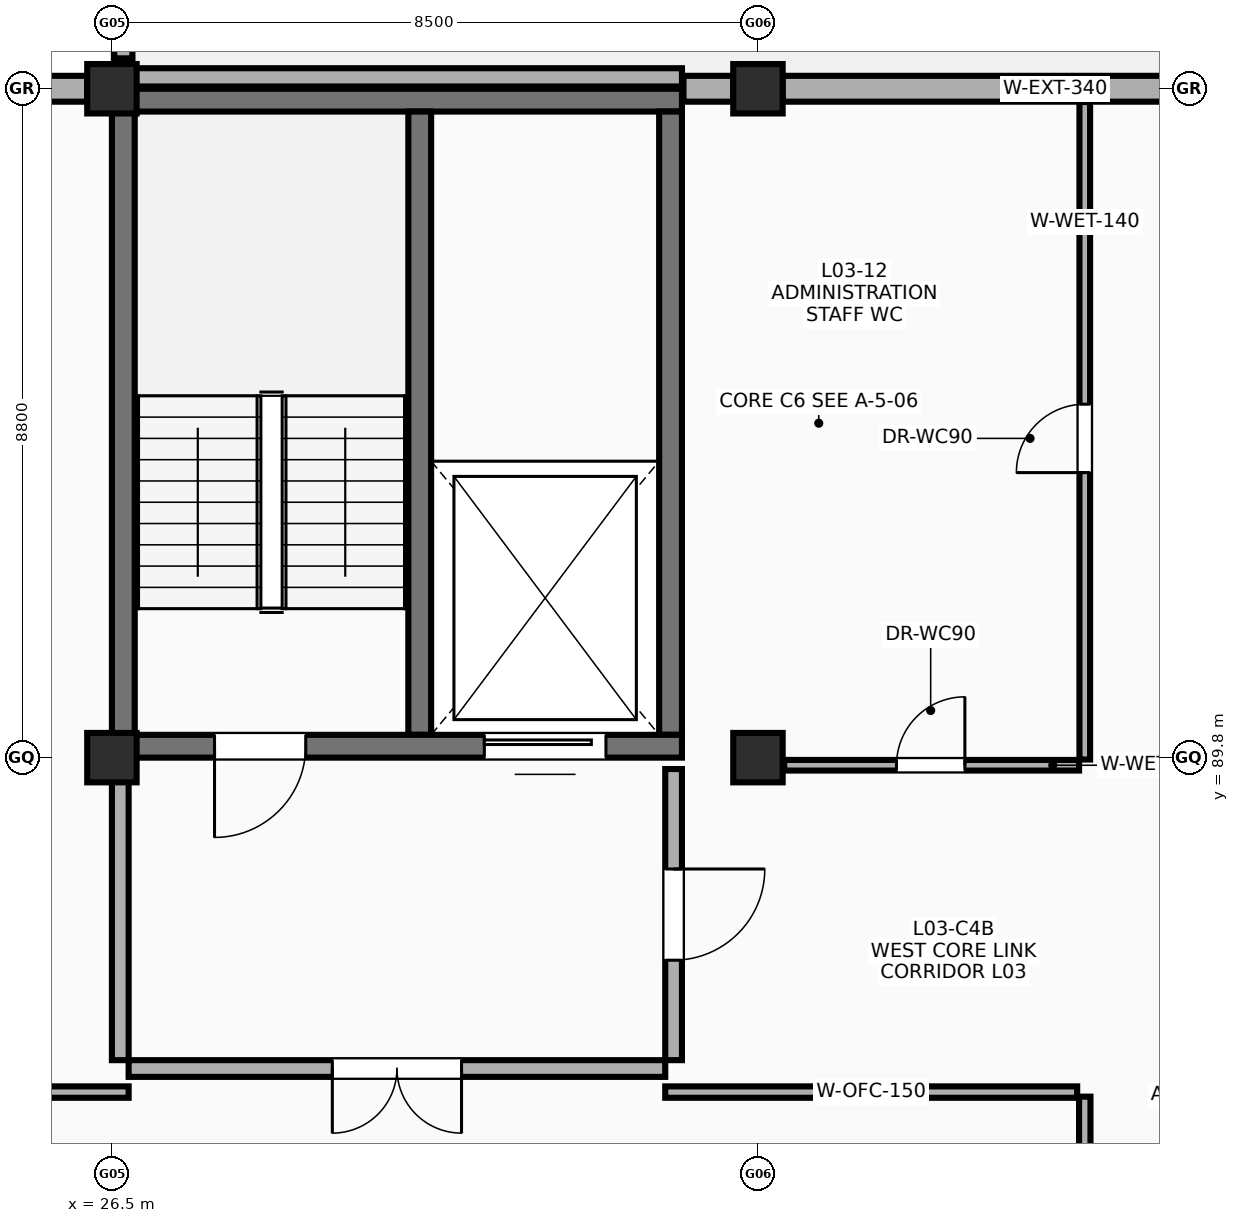
"""IFC4 building model, lengths in metres.
Left out: names, types, materials, properties, quantities, classifications, styles, units other than length and angle.
Written with IfcOpenShell. Run it as: python <this file> out.ifc"""

import sys

from ifc_helpers import new_model, si_unit, direction, frame, frame_2d, origin, origin_2d, place, context, subcontext, project, spatial, rectangle, extrude, element, fill, save


model = new_model("IFC4")
c1 = context("Model", 3, precision=1e-05, world=origin(), true_north=direction((0.0, 1.0)))
c2 = subcontext(c1, "Body", "Model", "MODEL_VIEW")
j1 = project(units=[si_unit("LENGTHUNIT", "METRE"), si_unit("PLANEANGLEUNIT", "RADIAN")], contexts=[c1])
p1 = place(None, origin())
s1 = spatial("IfcSite", under=j1, at=p1, CompositionType="ELEMENT")
p2 = place(p1, origin())
s2 = spatial("IfcBuilding", under=s1, at=p2, CompositionType="ELEMENT")
p3 = place(p2, frame((0.0, 0.0, 14.2)))
s3 = spatial("IfcBuildingStorey", under=s2, at=p3, CompositionType="ELEMENT", Elevation=14.2)
for number, where, z_axis, x_axis in (
    (1, (26.5, 89.8, 0.0), (0.0, 0.0, 1.0), (1.0, 0.0, 0.0)),
    (2, (26.5, 98.6, 0.0), (0.0, 0.0, 1.0), (1.0, 0.0, 0.0)),
    (3, (35.0, 89.8, 0.0), (0.0, 0.0, 1.0), (1.0, 0.0, 0.0)),
    (4, (35.0, 98.6, 0.0), (0.0, 0.0, 1.0), (1.0, 0.0, 0.0)),
):
    element("IfcColumn", number, at=place(p3, frame(where, z_axis=z_axis, x_axis=x_axis)), inside=s3, PredefinedType="COLUMN", context=c2, shape_type="SweptSolid", body=[
        extrude(rectangle(XDim=0.65, YDim=0.65, at=origin_2d()), origin(), (0.0, 0.0, 1.0), 3.8),
    ])
p4 = place(p3, frame((26.5, 98.45, 0.0), z_axis=(0.0, 0.0, 1.0), x_axis=(1.0, 0.0, 0.0)))
e5 = element("IfcWall", 5, at=p4, inside=s3, PredefinedType="SHEAR", context=c2, shape_type="SweptSolid", body=[
    extrude(rectangle(XDim=7.5, YDim=0.3, at=frame_2d((3.75, 0.0))), origin(), (0.0, 0.0, 1.0), 3.8),
])
for number, where, z_axis, x_axis in (
    (6, (26.65, 90.1, 0.0), (0.0, 0.0, 1.0), (0.0, 1.0, 0.0)),
    (7, (33.85, 90.1, 0.0), (0.0, 0.0, 1.0), (0.0, 1.0, 0.0)),
    (8, (30.55, 90.1, 0.0), (0.0, 0.0, 1.0), (0.0, 1.0, 0.0)),
):
    element("IfcWall", number, at=place(p3, frame(where, z_axis=z_axis, x_axis=x_axis)), inside=s3, PredefinedType="SHEAR", context=c2, shape_type="SweptSolid", body=[
        extrude(rectangle(XDim=8.2, YDim=0.3, at=frame_2d((4.1, 0.0))), origin(), (0.0, 0.0, 1.0), 3.8),
    ])
p5 = place(p3, frame((19.325, 98.6, 0.0), z_axis=(0.0, 0.0, 1.0), x_axis=(1.0, 0.0, 0.0)))
e9 = element("IfcWall", 9, at=p5, inside=s3, PredefinedType="SOLIDWALL", context=c2, shape_type="SweptSolid", body=[
    extrude(rectangle(XDim=6.85, YDim=0.34, at=frame_2d((3.425, 0.0))), origin(), (0.0, 0.0, 1.0), 2.35),
])
p6 = place(p3, frame((35.325, 98.6, 0.0), z_axis=(0.0, 0.0, 1.0), x_axis=(1.0, 0.0, 0.0)))
e10 = element("IfcWall", 10, at=p6, inside=s3, PredefinedType="SOLIDWALL", context=c2, shape_type="SweptSolid", body=[
    extrude(rectangle(XDim=7.175, YDim=0.34, at=frame_2d((3.587, 0.0))), origin(), (0.0, 0.0, 1.0), 2.35),
])
p7 = place(p3, frame((26.65, 99.0, 0.0), z_axis=(0.0, 0.0, 1.0), x_axis=(0.0, 1.0, 0.0)))
e11 = element("IfcWall", 11, at=p7, inside=s3, PredefinedType="PARAPET", context=c2, shape_type="SweptSolid", body=[
    extrude(rectangle(XDim=20.6, YDim=0.24, at=frame_2d((10.3, 0.0))), origin(), (0.0, 0.0, 1.0), 0.65),
])
p8 = place(p3, frame((26.5, 89.95, 0.0), z_axis=(0.0, 0.0, 1.0), x_axis=(1.0, 0.0, 0.0)))
e12 = element("IfcWall", 12, at=p8, inside=s3, PredefinedType="SHEAR", context=c2, shape_type="SweptSolid", body=[
    extrude(rectangle(XDim=7.5, YDim=0.3, at=frame_2d((3.75, 0.0))), origin(), (0.0, 0.0, 1.0), 3.8),
])
p9 = place(p8, frame((2.55, 0.0, 0.0), z_axis=(0.0, 0.0, 1.0), x_axis=(-1.0, 0.0, 0.0)))
e13 = element("IfcOpeningElement", 13, at=p9, cuts=e12, PredefinedType="OPENING", context=c2, shape_type="SweptSolid", body=[
    extrude(rectangle(XDim=1.2, YDim=2.15, at=frame_2d((0.6, 1.075))), frame((0.0, 0.16, 0.0), z_axis=(0.0, -1.0, 0.0), x_axis=(1.0, 0.0, 0.0)), (0.0, 0.0, 1.0), 0.32),
])
p10 = place(p8, frame((4.9, 0.0, 0.0)))
e14 = element("IfcOpeningElement", 14, at=p10, cuts=e12, PredefinedType="OPENING", context=c2, shape_type="SweptSolid", body=[
    extrude(rectangle(XDim=1.6, YDim=2.25, at=frame_2d((0.8, 1.125))), frame((0.0, 0.16, 0.0), z_axis=(0.0, -1.0, 0.0), x_axis=(1.0, 0.0, 0.0)), (0.0, 0.0, 1.0), 0.32),
])
p11 = place(p3, frame((26.72, 85.71, 0.0), z_axis=(0.0, 0.0, 1.0), x_axis=(1.0, 0.0, 0.0)))
e15 = element("IfcWall", 15, at=p11, inside=s3, PredefinedType="SOLIDWALL", context=c2, shape_type="SweptSolid", body=[
    extrude(rectangle(XDim=7.06, YDim=0.22, at=frame_2d((3.53, 0.0))), origin(), (0.0, 0.0, 1.0), 2.7),
])
p12 = place(p11, frame((4.38, 0.0, 0.0), z_axis=(0.0, 0.0, 1.0), x_axis=(-1.0, 0.0, 0.0)))
e16 = element("IfcOpeningElement", 16, at=p12, cuts=e15, PredefinedType="OPENING", context=c2, shape_type="SweptSolid", body=[
    extrude(rectangle(XDim=1.7, YDim=2.18, at=frame_2d((0.85, 1.09))), frame((0.0, 0.12, 0.0), z_axis=(0.0, -1.0, 0.0), x_axis=(1.0, 0.0, 0.0)), (0.0, 0.0, 1.0), 0.24),
])
p13 = place(p3, frame((26.61, 85.82, 0.0), z_axis=(0.0, 0.0, 1.0), x_axis=(0.0, 1.0, 0.0)))
e17 = element("IfcWall", 17, at=p13, inside=s3, PredefinedType="SOLIDWALL", context=c2, shape_type="SweptSolid", body=[
    extrude(rectangle(XDim=3.83, YDim=0.22, at=frame_2d((1.915, 0.0))), origin(), (0.0, 0.0, 1.0), 2.7),
])
p14 = place(p3, frame((33.89, 85.82, 0.0), z_axis=(0.0, 0.0, 1.0), x_axis=(0.0, 1.0, 0.0)))
e18 = element("IfcWall", 18, at=p14, inside=s3, PredefinedType="SOLIDWALL", context=c2, shape_type="SweptSolid", body=[
    extrude(rectangle(XDim=3.83, YDim=0.22, at=frame_2d((1.915, 0.0))), origin(), (0.0, 0.0, 1.0), 2.7),
])
p15 = place(p14, frame((2.515, 0.0, 0.0), z_axis=(0.0, 0.0, 1.0), x_axis=(-1.0, 0.0, 0.0)))
e19 = element("IfcOpeningElement", 19, at=p15, cuts=e18, PredefinedType="OPENING", context=c2, shape_type="SweptSolid", body=[
    extrude(rectangle(XDim=1.2, YDim=2.15, at=frame_2d((0.6, 1.075))), frame((0.0, 0.12, 0.0), z_axis=(0.0, -1.0, 0.0), x_axis=(1.0, 0.0, 0.0)), (0.0, 0.0, 1.0), 0.24),
])
p16 = place(p3, frame((39.3, 72.18, 0.0), z_axis=(0.0, 0.0, 1.0), x_axis=(0.0, 1.0, 0.0)))
e20 = element("IfcWall", 20, at=p16, inside=s3, PredefinedType="PARTITIONING", context=c2, shape_type="SweptSolid", body=[
    extrude(rectangle(XDim=13.16, YDim=0.15, at=frame_2d((6.58, 0.0))), origin(), (0.0, 0.0, 1.0), 2.7),
])
p17 = place(p16, frame((6.145, 0.0, 0.0)))
e21 = element("IfcOpeningElement", 21, at=p17, cuts=e20, PredefinedType="OPENING", context=c2, shape_type="SweptSolid", body=[
    extrude(rectangle(XDim=0.95, YDim=2.15, at=frame_2d((0.475, 1.075))), frame((0.0, 0.085, 0.0), z_axis=(0.0, -1.0, 0.0), x_axis=(1.0, 0.0, 0.0)), (0.0, 0.0, 1.0), 0.17),
])
p18 = place(p3, frame((39.3, 89.775, 0.0), z_axis=(0.0, 0.0, 1.0), x_axis=(0.0, 1.0, 0.0)))
e22 = element("IfcWall", 22, at=p18, inside=s3, PredefinedType="PARTITIONING", context=c2, shape_type="SweptSolid", body=[
    extrude(rectangle(XDim=8.65, YDim=0.14, at=frame_2d((4.325, 0.0))), origin(), (0.0, 0.0, 1.0), 2.7),
])
p19 = place(p18, frame((3.775, 0.0, 0.0)))
e23 = element("IfcOpeningElement", 23, at=p19, cuts=e22, PredefinedType="OPENING", context=c2, shape_type="SweptSolid", body=[
    extrude(rectangle(XDim=0.9, YDim=2.1, at=frame_2d((0.45, 1.05))), frame((0.0, 0.08, 0.0), z_axis=(0.0, -1.0, 0.0), x_axis=(1.0, 0.0, 0.0)), (0.0, 0.0, 1.0), 0.16),
])
p20 = place(p3, frame((35.345, 89.7, 0.0), z_axis=(0.0, 0.0, 1.0), x_axis=(1.0, 0.0, 0.0)))
e24 = element("IfcWall", 24, at=p20, inside=s3, PredefinedType="PARTITIONING", context=c2, shape_type="SweptSolid", body=[
    extrude(rectangle(XDim=3.88, YDim=0.14, at=frame_2d((1.94, 0.0))), origin(), (0.0, 0.0, 1.0), 2.7),
])
p21 = place(p20, frame((1.478, 0.0, 0.0)))
e25 = element("IfcOpeningElement", 25, at=p21, cuts=e24, PredefinedType="OPENING", context=c2, shape_type="SweptSolid", body=[
    extrude(rectangle(XDim=0.9, YDim=2.1, at=frame_2d((0.45, 1.05))), frame((0.0, 0.08, 0.0), z_axis=(0.0, -1.0, 0.0), x_axis=(1.0, 0.0, 0.0)), (0.0, 0.0, 1.0), 0.16),
])
p22 = place(p3, frame((19.4, 85.4, 0.0), z_axis=(0.0, 0.0, 1.0), x_axis=(1.0, 0.0, 0.0)))
e26 = element("IfcWall", 26, at=p22, inside=s3, PredefinedType="PARTITIONING", context=c2, shape_type="SweptSolid", body=[
    extrude(rectangle(XDim=7.32, YDim=0.15, at=frame_2d((3.66, 0.0))), origin(), (0.0, 0.0, 1.0), 2.7),
])
p23 = place(p3, frame((33.78, 85.4, 0.0), z_axis=(0.0, 0.0, 1.0), x_axis=(1.0, 0.0, 0.0)))
e27 = element("IfcWall", 27, at=p23, inside=s3, PredefinedType="PARTITIONING", context=c2, shape_type="SweptSolid", body=[
    extrude(rectangle(XDim=5.42, YDim=0.15, at=frame_2d((2.71, 0.0))), origin(), (0.0, 0.0, 1.0), 2.7),
])
p24 = place(p3, frame((34.02, 98.6, 0.0), z_axis=(0.0, 0.0, 1.0), x_axis=(1.0, 0.0, 0.0)))
e28 = element("IfcWall", 28, at=p24, inside=s3, PredefinedType="SOLIDWALL", context=c2, shape_type="SweptSolid", body=[
    extrude(rectangle(XDim=0.655, YDim=0.34, at=frame_2d((0.328, 0.0))), origin(), (0.0, 0.0, 1.0), 2.35),
])
p25 = place(p3, frame((26.65, 98.75, 0.0), z_axis=(0.0, 0.0, 1.0), x_axis=(1.0, 0.0, 0.0)))
e29 = element("IfcWall", 29, at=p25, inside=s3, PredefinedType="PARAPET", context=c2, shape_type="SweptSolid", body=[
    extrude(rectangle(XDim=7.35, YDim=0.24, at=frame_2d((3.675, 0.0))), origin(), (0.0, 0.0, 1.0), 0.65),
])
p26 = place(p3, frame((34.695, 98.75, 0.0), z_axis=(0.0, 0.0, 1.0), x_axis=(1.0, 0.0, 0.0)))
e30 = element("IfcWall", 30, at=p26, inside=s3, PredefinedType="PARAPET", context=c2, shape_type="SweptSolid", body=[
    extrude(rectangle(XDim=0.61, YDim=0.24, at=frame_2d((0.305, 0.0))), origin(), (0.0, 0.0, 1.0), 0.65),
])
p27 = place(p9, origin())
e31 = element("IfcDoor", 31, at=p27, inside=s3, OperationType="SINGLE_SWING_RIGHT", PredefinedType="DOOR", context=c2, shape_type="SweptSolid", body=[
    extrude(rectangle(XDim=1.2, YDim=2.15, at=frame_2d((0.6, 1.075))), frame((0.0, 0.025, 0.0), z_axis=(0.0, -1.0, 0.0), x_axis=(1.0, 0.0, 0.0)), (0.0, 0.0, 1.0), 0.05),
])
fill(e13, e31)
p28 = place(p10, origin())
e32 = element("IfcDoor", 32, at=p28, inside=s3, OperationType="SLIDING_TO_LEFT", PredefinedType="DOOR", context=c2, shape_type="SweptSolid", body=[
    extrude(rectangle(XDim=1.6, YDim=2.25, at=frame_2d((0.8, 1.125))), frame((0.0, 0.025, 0.0), z_axis=(0.0, -1.0, 0.0), x_axis=(1.0, 0.0, 0.0)), (0.0, 0.0, 1.0), 0.05),
])
fill(e14, e32)
p29 = place(p12, origin())
e33 = element("IfcDoor", 33, at=p29, inside=s3, OperationType="DOUBLE_DOOR_SINGLE_SWING", PredefinedType="DOOR", context=c2, shape_type="SweptSolid", body=[
    extrude(rectangle(XDim=1.7, YDim=2.18, at=frame_2d((0.85, 1.09))), frame((0.0, 0.025, 0.0), z_axis=(0.0, -1.0, 0.0), x_axis=(1.0, 0.0, 0.0)), (0.0, 0.0, 1.0), 0.05),
])
fill(e16, e33)
p30 = place(p15, origin())
e34 = element("IfcDoor", 34, at=p30, inside=s3, OperationType="SINGLE_SWING_LEFT", PredefinedType="DOOR", context=c2, shape_type="SweptSolid", body=[
    extrude(rectangle(XDim=1.2, YDim=2.15, at=frame_2d((0.6, 1.075))), frame((0.0, 0.025, 0.0), z_axis=(0.0, -1.0, 0.0), x_axis=(1.0, 0.0, 0.0)), (0.0, 0.0, 1.0), 0.05),
])
fill(e19, e34)
p31 = place(p19, origin())
e35 = element("IfcDoor", 35, at=p31, inside=s3, OperationType="SINGLE_SWING_LEFT", PredefinedType="DOOR", context=c2, shape_type="SweptSolid", body=[
    extrude(rectangle(XDim=0.9, YDim=2.1, at=frame_2d((0.45, 1.05))), frame((0.0, 0.025, 0.0), z_axis=(0.0, -1.0, 0.0), x_axis=(1.0, 0.0, 0.0)), (0.0, 0.0, 1.0), 0.05),
])
fill(e23, e35)
p32 = place(p21, origin())
e36 = element("IfcDoor", 36, at=p32, inside=s3, OperationType="SINGLE_SWING_RIGHT", PredefinedType="DOOR", context=c2, shape_type="SweptSolid", body=[
    extrude(rectangle(XDim=0.9, YDim=2.1, at=frame_2d((0.45, 1.05))), frame((0.0, 0.025, 0.0), z_axis=(0.0, -1.0, 0.0), x_axis=(1.0, 0.0, 0.0)), (0.0, 0.0, 1.0), 0.05),
])
fill(e25, e36)
save(model, sys.argv[1])
